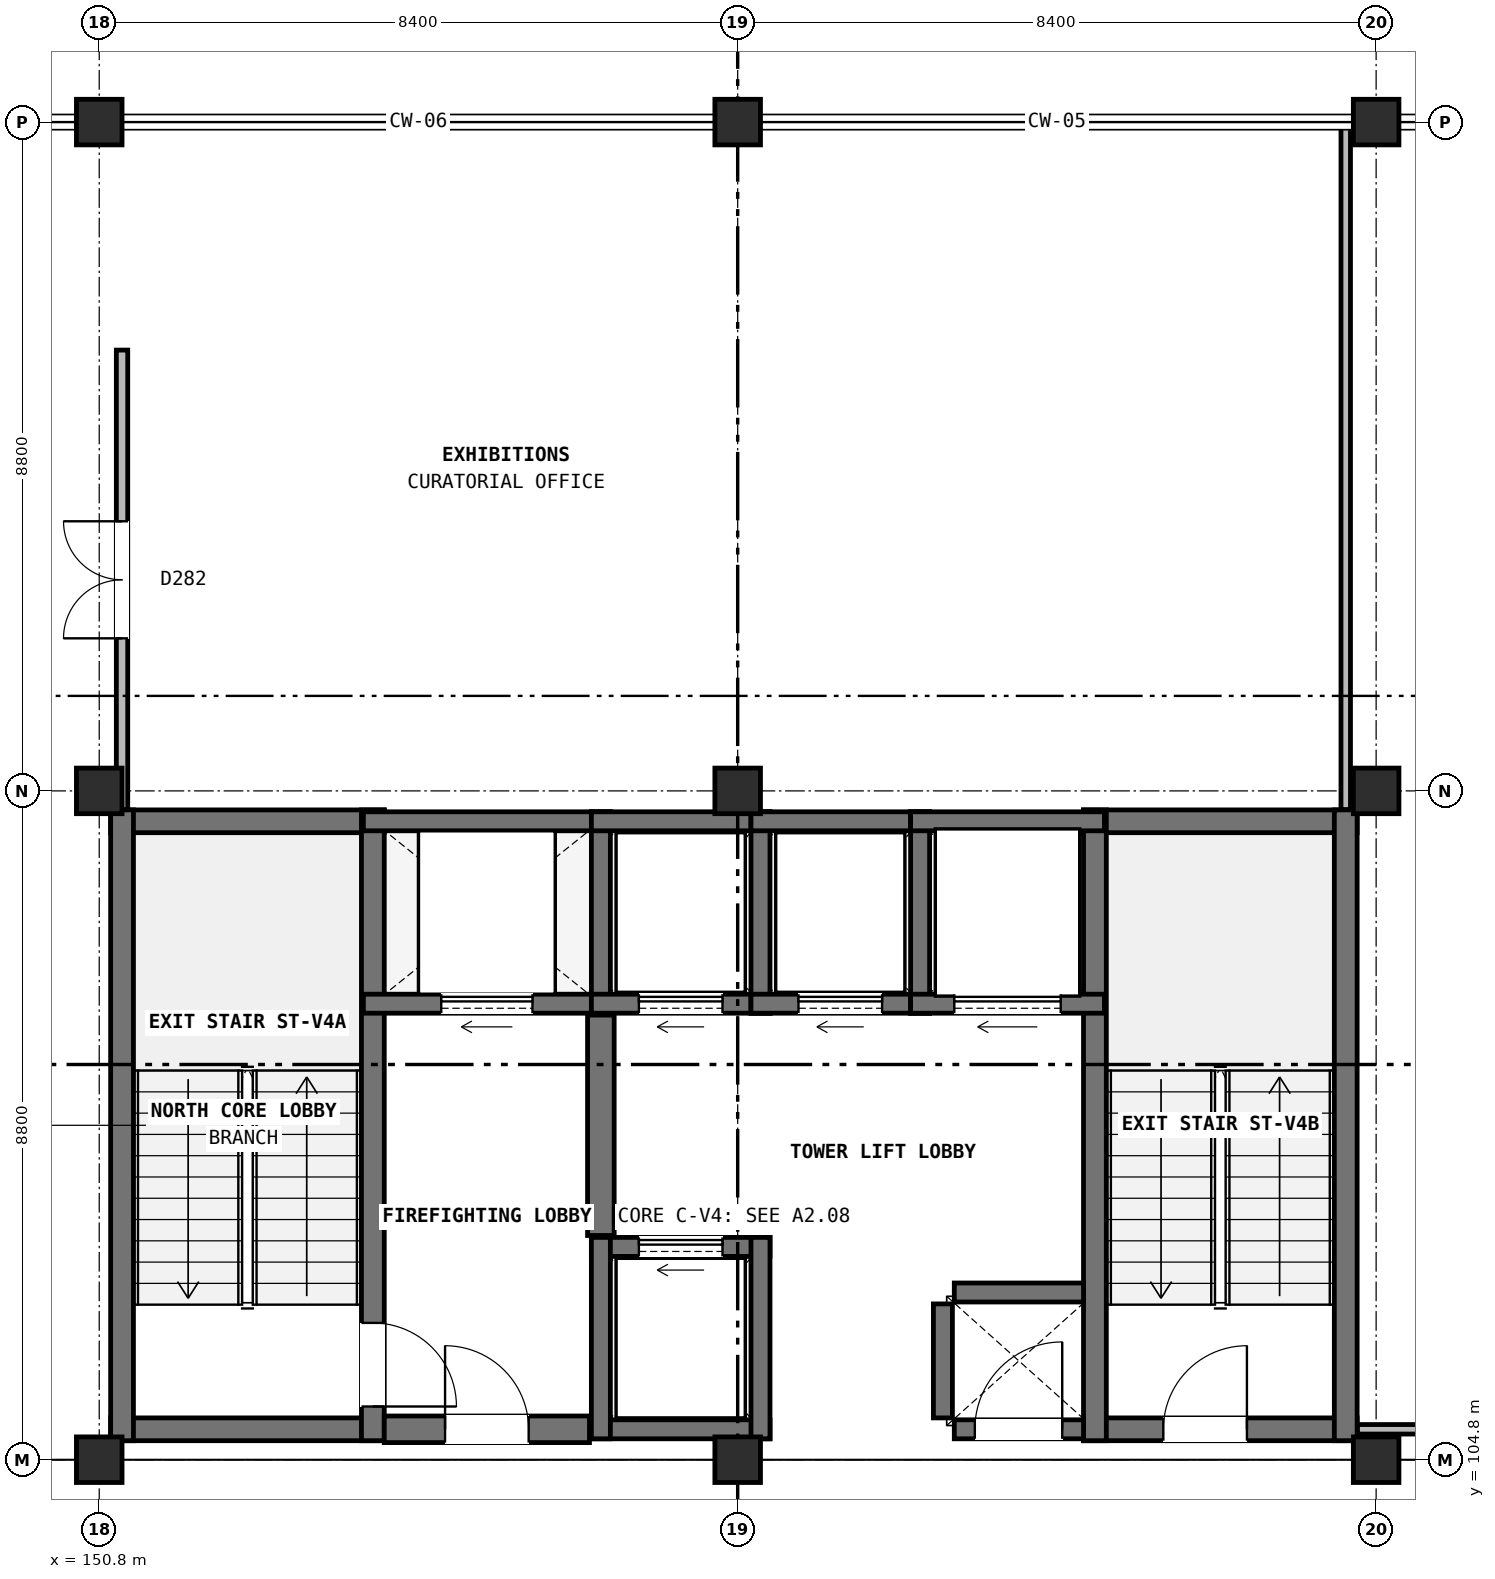
"""IFC4 building model, lengths in metres.
Left out: names, types, materials, properties, quantities, classifications, styles, units other than length and angle.
Written with IfcOpenShell. Run it as: python <this file> out.ifc"""

import sys

from ifc_helpers import new_model, si_unit, direction, frame, frame_2d, origin, origin_2d, place, context, subcontext, project, spatial, rectangle, extrude, element, fill, save


model = new_model("IFC4")
c1 = context("Model", 3, precision=1e-05, world=origin(), true_north=direction((0.0, 1.0)))
c2 = subcontext(c1, "Body", "Model", "MODEL_VIEW")
j1 = project(units=[si_unit("LENGTHUNIT", "METRE"), si_unit("PLANEANGLEUNIT", "RADIAN")], contexts=[c1])
p1 = place(None, origin())
s1 = spatial("IfcSite", under=j1, at=p1, CompositionType="ELEMENT")
p2 = place(p1, origin())
s2 = spatial("IfcBuilding", under=s1, at=p2, CompositionType="ELEMENT")
p3 = place(p2, frame((0.0, 0.0, 59.8)))
s3 = spatial("IfcBuildingStorey", under=s2, at=p3, CompositionType="ELEMENT", Elevation=59.8)
for number, where, z_axis, x_axis in (
    (1, (150.8, 104.8, 0.0), (0.0, 0.0, 1.0), (1.0, 0.0, 0.0)),
    (2, (150.8, 113.6, 0.0), (0.0, 0.0, 1.0), (1.0, 0.0, 0.0)),
    (3, (150.8, 122.4, 0.0), (0.0, 0.0, 1.0), (1.0, 0.0, 0.0)),
    (4, (159.2, 104.8, 0.0), (0.0, 0.0, 1.0), (1.0, 0.0, 0.0)),
    (5, (159.2, 113.6, 0.0), (0.0, 0.0, 1.0), (1.0, 0.0, 0.0)),
    (6, (159.2, 122.4, 0.0), (0.0, 0.0, 1.0), (1.0, 0.0, 0.0)),
    (7, (167.6, 104.8, 0.0), (0.0, 0.0, 1.0), (1.0, 0.0, 0.0)),
    (8, (167.6, 113.6, 0.0), (0.0, 0.0, 1.0), (1.0, 0.0, 0.0)),
    (9, (167.6, 122.4, 0.0), (0.0, 0.0, 1.0), (1.0, 0.0, 0.0)),
):
    element("IfcColumn", number, at=place(p3, frame(where, z_axis=z_axis, x_axis=x_axis)), inside=s3, PredefinedType="COLUMN", context=c2, shape_type="SweptSolid", body=[
        extrude(rectangle(XDim=0.6, YDim=0.6, at=origin_2d()), origin(), (0.0, 0.0, 1.0), 4.0),
    ])
for number, where, z_axis, x_axis in (
    (10, (150.95, 105.2, 0.0), (0.0, 0.0, 1.0), (1.0, 0.0, 0.0)),
    (11, (150.95, 113.2, 0.0), (0.0, 0.0, 1.0), (1.0, 0.0, 0.0)),
):
    element("IfcWall", number, at=place(p3, frame(where, z_axis=z_axis, x_axis=x_axis)), inside=s3, PredefinedType="SHEAR", context=c2, shape_type="SweptSolid", body=[
        extrude(rectangle(XDim=3.6, YDim=0.3, at=frame_2d((1.8, 0.0))), origin(), (0.0, 0.0, 1.0), 4.0),
    ])
p4 = place(p3, frame((151.1, 105.05, 0.0), z_axis=(0.0, 0.0, 1.0), x_axis=(0.0, 1.0, 0.0)))
e12 = element("IfcWall", 12, at=p4, inside=s3, PredefinedType="SHEAR", context=c2, shape_type="SweptSolid", body=[
    extrude(rectangle(XDim=8.3, YDim=0.3, at=frame_2d((4.15, 0.0))), origin(), (0.0, 0.0, 1.0), 4.0),
])
p5 = place(p3, frame((154.4, 105.05, 0.0), z_axis=(0.0, 0.0, 1.0), x_axis=(0.0, 1.0, 0.0)))
e13 = element("IfcWall", 13, at=p5, inside=s3, PredefinedType="SHEAR", context=c2, shape_type="SweptSolid", body=[
    extrude(rectangle(XDim=8.3, YDim=0.3, at=frame_2d((4.15, 0.0))), origin(), (0.0, 0.0, 1.0), 4.0),
])
p6 = place(p5, frame((0.45, 0.0, 0.0)))
e14 = element("IfcOpeningElement", 14, at=p6, cuts=e13, PredefinedType="OPENING", context=c2, shape_type="SweptSolid", body=[
    extrude(rectangle(XDim=1.1, YDim=2.2, at=frame_2d((0.55, 1.1))), frame((0.0, 0.16, 0.0), z_axis=(0.0, -1.0, 0.0), x_axis=(1.0, 0.0, 0.0)), (0.0, 0.0, 1.0), 0.32),
])
p7 = place(p3, frame((163.75, 105.2, 0.0), z_axis=(0.0, 0.0, 1.0), x_axis=(1.0, 0.0, 0.0)))
e15 = element("IfcWall", 15, at=p7, inside=s3, PredefinedType="SHEAR", context=c2, shape_type="SweptSolid", body=[
    extrude(rectangle(XDim=3.6, YDim=0.3, at=frame_2d((1.8, 0.0))), origin(), (0.0, 0.0, 1.0), 4.0),
])
p8 = place(p7, frame((1.05, 0.0, 0.0)))
e16 = element("IfcOpeningElement", 16, at=p8, cuts=e15, PredefinedType="OPENING", context=c2, shape_type="SweptSolid", body=[
    extrude(rectangle(XDim=1.1, YDim=2.2, at=frame_2d((0.55, 1.1))), frame((0.0, 0.16, 0.0), z_axis=(0.0, -1.0, 0.0), x_axis=(1.0, 0.0, 0.0)), (0.0, 0.0, 1.0), 0.32),
])
p9 = place(p3, frame((163.75, 113.2, 0.0), z_axis=(0.0, 0.0, 1.0), x_axis=(1.0, 0.0, 0.0)))
e17 = element("IfcWall", 17, at=p9, inside=s3, PredefinedType="SHEAR", context=c2, shape_type="SweptSolid", body=[
    extrude(rectangle(XDim=3.6, YDim=0.3, at=frame_2d((1.8, 0.0))), origin(), (0.0, 0.0, 1.0), 4.0),
])
for number, where, z_axis, x_axis in (
    (18, (163.9, 105.05, 0.0), (0.0, 0.0, 1.0), (0.0, 1.0, 0.0)),
    (19, (167.2, 105.05, 0.0), (0.0, 0.0, 1.0), (0.0, 1.0, 0.0)),
):
    element("IfcWall", number, at=place(p3, frame(where, z_axis=z_axis, x_axis=x_axis)), inside=s3, PredefinedType="SHEAR", context=c2, shape_type="SweptSolid", body=[
        extrude(rectangle(XDim=8.3, YDim=0.3, at=frame_2d((4.15, 0.0))), origin(), (0.0, 0.0, 1.0), 4.0),
    ])
p10 = place(p3, frame((154.275, 110.8, 0.0), z_axis=(0.0, 0.0, 1.0), x_axis=(1.0, 0.0, 0.0)))
e20 = element("IfcWall", 20, at=p10, inside=s3, PredefinedType="SOLIDWALL", context=c2, shape_type="SweptSolid", body=[
    extrude(rectangle(XDim=3.25, YDim=0.25, at=frame_2d((1.625, 0.0))), origin(), (0.0, 0.0, 1.0), 3.68),
])
p11 = place(p10, frame((1.025, 0.0, 0.0)))
e21 = element("IfcOpeningElement", 21, at=p11, cuts=e20, PredefinedType="OPENING", context=c2, shape_type="SweptSolid", body=[
    extrude(rectangle(XDim=1.2, YDim=2.2, at=frame_2d((0.6, 1.1))), frame((0.0, 0.135, 0.0), z_axis=(0.0, -1.0, 0.0), x_axis=(1.0, 0.0, 0.0)), (0.0, 0.0, 1.0), 0.27),
])
p12 = place(p3, frame((154.275, 113.2, 0.0), z_axis=(0.0, 0.0, 1.0), x_axis=(1.0, 0.0, 0.0)))
e22 = element("IfcWall", 22, at=p12, inside=s3, PredefinedType="SOLIDWALL", context=c2, shape_type="SweptSolid", body=[
    extrude(rectangle(XDim=3.25, YDim=0.25, at=frame_2d((1.625, 0.0))), origin(), (0.0, 0.0, 1.0), 3.68),
])
p13 = place(p3, frame((157.4, 110.675, 0.0), z_axis=(0.0, 0.0, 1.0), x_axis=(0.0, 1.0, 0.0)))
e23 = element("IfcWall", 23, at=p13, inside=s3, PredefinedType="SOLIDWALL", context=c2, shape_type="SweptSolid", body=[
    extrude(rectangle(XDim=2.65, YDim=0.25, at=frame_2d((1.325, 0.0))), origin(), (0.0, 0.0, 1.0), 3.68),
])
p14 = place(p3, frame((157.275, 110.8, 0.0), z_axis=(0.0, 0.0, 1.0), x_axis=(1.0, 0.0, 0.0)))
e24 = element("IfcWall", 24, at=p14, inside=s3, PredefinedType="SOLIDWALL", context=c2, shape_type="SweptSolid", body=[
    extrude(rectangle(XDim=2.35, YDim=0.25, at=frame_2d((1.175, 0.0))), origin(), (0.0, 0.0, 1.0), 3.68),
])
p15 = place(p14, frame((0.625, 0.0, 0.0)))
e25 = element("IfcOpeningElement", 25, at=p15, cuts=e24, PredefinedType="OPENING", context=c2, shape_type="SweptSolid", body=[
    extrude(rectangle(XDim=1.1, YDim=2.2, at=frame_2d((0.55, 1.1))), frame((0.0, 0.135, 0.0), z_axis=(0.0, -1.0, 0.0), x_axis=(1.0, 0.0, 0.0)), (0.0, 0.0, 1.0), 0.27),
])
p16 = place(p3, frame((157.275, 113.2, 0.0), z_axis=(0.0, 0.0, 1.0), x_axis=(1.0, 0.0, 0.0)))
e26 = element("IfcWall", 26, at=p16, inside=s3, PredefinedType="SOLIDWALL", context=c2, shape_type="SweptSolid", body=[
    extrude(rectangle(XDim=2.35, YDim=0.25, at=frame_2d((1.175, 0.0))), origin(), (0.0, 0.0, 1.0), 3.68),
])
p17 = place(p3, frame((159.5, 110.675, 0.0), z_axis=(0.0, 0.0, 1.0), x_axis=(0.0, 1.0, 0.0)))
e27 = element("IfcWall", 27, at=p17, inside=s3, PredefinedType="SOLIDWALL", context=c2, shape_type="SweptSolid", body=[
    extrude(rectangle(XDim=2.65, YDim=0.25, at=frame_2d((1.325, 0.0))), origin(), (0.0, 0.0, 1.0), 3.68),
])
p18 = place(p3, frame((159.375, 110.8, 0.0), z_axis=(0.0, 0.0, 1.0), x_axis=(1.0, 0.0, 0.0)))
e28 = element("IfcWall", 28, at=p18, inside=s3, PredefinedType="SOLIDWALL", context=c2, shape_type="SweptSolid", body=[
    extrude(rectangle(XDim=2.35, YDim=0.25, at=frame_2d((1.175, 0.0))), origin(), (0.0, 0.0, 1.0), 3.68),
])
p19 = place(p18, frame((0.625, 0.0, 0.0)))
e29 = element("IfcOpeningElement", 29, at=p19, cuts=e28, PredefinedType="OPENING", context=c2, shape_type="SweptSolid", body=[
    extrude(rectangle(XDim=1.1, YDim=2.2, at=frame_2d((0.55, 1.1))), frame((0.0, 0.135, 0.0), z_axis=(0.0, -1.0, 0.0), x_axis=(1.0, 0.0, 0.0)), (0.0, 0.0, 1.0), 0.27),
])
p20 = place(p3, frame((159.375, 113.2, 0.0), z_axis=(0.0, 0.0, 1.0), x_axis=(1.0, 0.0, 0.0)))
e30 = element("IfcWall", 30, at=p20, inside=s3, PredefinedType="SOLIDWALL", context=c2, shape_type="SweptSolid", body=[
    extrude(rectangle(XDim=2.35, YDim=0.25, at=frame_2d((1.175, 0.0))), origin(), (0.0, 0.0, 1.0), 3.68),
])
p21 = place(p3, frame((161.6, 110.675, 0.0), z_axis=(0.0, 0.0, 1.0), x_axis=(0.0, 1.0, 0.0)))
e31 = element("IfcWall", 31, at=p21, inside=s3, PredefinedType="SOLIDWALL", context=c2, shape_type="SweptSolid", body=[
    extrude(rectangle(XDim=2.65, YDim=0.25, at=frame_2d((1.325, 0.0))), origin(), (0.0, 0.0, 1.0), 3.68),
])
p22 = place(p3, frame((157.275, 105.2, 0.0), z_axis=(0.0, 0.0, 1.0), x_axis=(1.0, 0.0, 0.0)))
e32 = element("IfcWall", 32, at=p22, inside=s3, PredefinedType="SOLIDWALL", context=c2, shape_type="SweptSolid", body=[
    extrude(rectangle(XDim=2.35, YDim=0.25, at=frame_2d((1.175, 0.0))), origin(), (0.0, 0.0, 1.0), 3.68),
])
p23 = place(p3, frame((157.275, 107.6, 0.0), z_axis=(0.0, 0.0, 1.0), x_axis=(1.0, 0.0, 0.0)))
e33 = element("IfcWall", 33, at=p23, inside=s3, PredefinedType="SOLIDWALL", context=c2, shape_type="SweptSolid", body=[
    extrude(rectangle(XDim=2.35, YDim=0.25, at=frame_2d((1.175, 0.0))), origin(), (0.0, 0.0, 1.0), 3.68),
])
p24 = place(p23, frame((0.625, 0.0, 0.0)))
e34 = element("IfcOpeningElement", 34, at=p24, cuts=e33, PredefinedType="OPENING", context=c2, shape_type="SweptSolid", body=[
    extrude(rectangle(XDim=1.1, YDim=2.2, at=frame_2d((0.55, 1.1))), frame((0.0, 0.135, 0.0), z_axis=(0.0, -1.0, 0.0), x_axis=(1.0, 0.0, 0.0)), (0.0, 0.0, 1.0), 0.27),
])
for number, where, z_axis, x_axis in (
    (35, (157.4, 105.075, 0.0), (0.0, 0.0, 1.0), (0.0, 1.0, 0.0)),
    (36, (159.5, 105.075, 0.0), (0.0, 0.0, 1.0), (0.0, 1.0, 0.0)),
):
    element("IfcWall", number, at=place(p3, frame(where, z_axis=z_axis, x_axis=x_axis)), inside=s3, PredefinedType="SOLIDWALL", context=c2, shape_type="SweptSolid", body=[
        extrude(rectangle(XDim=2.65, YDim=0.25, at=frame_2d((1.325, 0.0))), origin(), (0.0, 0.0, 1.0), 3.68),
    ])
p25 = place(p3, frame((161.475, 110.8, 0.0), z_axis=(0.0, 0.0, 1.0), x_axis=(1.0, 0.0, 0.0)))
e37 = element("IfcWall", 37, at=p25, inside=s3, PredefinedType="SOLIDWALL", context=c2, shape_type="SweptSolid", body=[
    extrude(rectangle(XDim=2.55, YDim=0.25, at=frame_2d((1.275, 0.0))), origin(), (0.0, 0.0, 1.0), 3.68),
])
p26 = place(p25, frame((0.575, 0.0, 0.0)))
e38 = element("IfcOpeningElement", 38, at=p26, cuts=e37, PredefinedType="OPENING", context=c2, shape_type="SweptSolid", body=[
    extrude(rectangle(XDim=1.4, YDim=2.3, at=frame_2d((0.7, 1.15))), frame((0.0, 0.135, 0.0), z_axis=(0.0, -1.0, 0.0), x_axis=(1.0, 0.0, 0.0)), (0.0, 0.0, 1.0), 0.27),
])
p27 = place(p3, frame((161.475, 113.2, 0.0), z_axis=(0.0, 0.0, 1.0), x_axis=(1.0, 0.0, 0.0)))
e39 = element("IfcWall", 39, at=p27, inside=s3, PredefinedType="SOLIDWALL", context=c2, shape_type="SweptSolid", body=[
    extrude(rectangle(XDim=2.55, YDim=0.25, at=frame_2d((1.275, 0.0))), origin(), (0.0, 0.0, 1.0), 3.68),
])
p28 = place(p3, frame((157.4, 107.75, 0.0), z_axis=(0.0, 0.0, 1.0), x_axis=(0.0, 1.0, 0.0)))
e40 = element("IfcWall", 40, at=p28, inside=s3, PredefinedType="SHEAR", context=c2, shape_type="SweptSolid", body=[
    extrude(rectangle(XDim=2.9, YDim=0.35, at=frame_2d((1.45, 0.0))), origin(), (0.0, 0.0, 1.0), 3.68),
])
p29 = place(p3, frame((154.55, 105.2, 0.0), z_axis=(0.0, 0.0, 1.0), x_axis=(1.0, 0.0, 0.0)))
e41 = element("IfcWall", 41, at=p29, inside=s3, PredefinedType="SHEAR", context=c2, shape_type="SweptSolid", body=[
    extrude(rectangle(XDim=2.7, YDim=0.35, at=frame_2d((1.35, 0.0))), origin(), (0.0, 0.0, 1.0), 3.68),
])
p30 = place(p29, frame((0.8, 0.0, 0.0)))
e42 = element("IfcOpeningElement", 42, at=p30, cuts=e41, PredefinedType="OPENING", context=c2, shape_type="SweptSolid", body=[
    extrude(rectangle(XDim=1.1, YDim=2.2, at=frame_2d((0.55, 1.1))), frame((0.0, 0.185, 0.0), z_axis=(0.0, -1.0, 0.0), x_axis=(1.0, 0.0, 0.0)), (0.0, 0.0, 1.0), 0.37),
])
p31 = place(p3, frame((161.9, 105.35, 0.0), z_axis=(0.0, 0.0, 1.0), x_axis=(0.0, 1.0, 0.0)))
e43 = element("IfcWall", 43, at=p31, inside=s3, PredefinedType="SOLIDWALL", context=c2, shape_type="SweptSolid", body=[
    extrude(rectangle(XDim=1.5, YDim=0.25, at=frame_2d((0.75, 0.0))), origin(), (0.0, 0.0, 1.0), 3.68),
])
p32 = place(p3, frame((162.05, 107.0, 0.0), z_axis=(0.0, 0.0, 1.0), x_axis=(1.0, 0.0, 0.0)))
e44 = element("IfcWall", 44, at=p32, inside=s3, PredefinedType="SOLIDWALL", context=c2, shape_type="SweptSolid", body=[
    extrude(rectangle(XDim=1.7, YDim=0.25, at=frame_2d((0.85, 0.0))), origin(), (0.0, 0.0, 1.0), 3.68),
])
p33 = place(p3, frame((162.05, 105.2, 0.0), z_axis=(0.0, 0.0, 1.0), x_axis=(1.0, 0.0, 0.0)))
e45 = element("IfcWall", 45, at=p33, inside=s3, PredefinedType="SOLIDWALL", context=c2, shape_type="SweptSolid", body=[
    extrude(rectangle(XDim=1.7, YDim=0.25, at=frame_2d((0.85, 0.0))), origin(), (0.0, 0.0, 1.0), 3.68),
])
p34 = place(p33, frame((0.27, 0.0, 0.0)))
e46 = element("IfcOpeningElement", 46, at=p34, cuts=e45, PredefinedType="OPENING", context=c2, shape_type="SweptSolid", body=[
    extrude(rectangle(XDim=1.15, YDim=2.2, at=frame_2d((0.575, 1.1))), frame((0.0, 0.135, 0.0), z_axis=(0.0, -1.0, 0.0), x_axis=(1.0, 0.0, 0.0)), (0.0, 0.0, 1.0), 0.27),
])
p35 = place(p3, frame((167.355, 105.2, 0.0), z_axis=(0.0, 0.0, 1.0), x_axis=(1.0, 0.0, 0.0)))
e47 = element("IfcWall", 47, at=p35, inside=s3, PredefinedType="PARTITIONING", context=c2, shape_type="SweptSolid", body=[
    extrude(rectangle(XDim=4.245, YDim=0.125, at=frame_2d((2.123, 0.0))), origin(), (0.0, 0.0, 1.0), 3.245),
])
p36 = place(p35, frame((1.633, 0.0, 0.0)))
e48 = element("IfcOpeningElement", 48, at=p36, cuts=e47, PredefinedType="OPENING", context=c2, shape_type="SweptSolid", body=[
    extrude(rectangle(XDim=0.98, YDim=2.1, at=frame_2d((0.49, 1.05))), frame((0.0, 0.073, 0.0), z_axis=(0.0, -1.0, 0.0), x_axis=(1.0, 0.0, 0.0)), (0.0, 0.0, 1.0), 0.145),
])
p37 = place(p3, frame((151.1, 113.355, 0.0), z_axis=(0.0, 0.0, 1.0), x_axis=(0.0, 1.0, 0.0)))
e49 = element("IfcWall", 49, at=p37, inside=s3, PredefinedType="PARTITIONING", context=c2, shape_type="SweptSolid", body=[
    extrude(rectangle(XDim=6.045, YDim=0.15, at=frame_2d((3.022, 0.0))), origin(), (0.0, 0.0, 1.0), 3.245),
])
p38 = place(p37, frame((2.252, 0.0, 0.0)))
e50 = element("IfcOpeningElement", 50, at=p38, cuts=e49, PredefinedType="OPENING", context=c2, shape_type="SweptSolid", body=[
    extrude(rectangle(XDim=1.54, YDim=2.3, at=frame_2d((0.77, 1.15))), frame((0.0, 0.085, 0.0), z_axis=(0.0, -1.0, 0.0), x_axis=(1.0, 0.0, 0.0)), (0.0, 0.0, 1.0), 0.17),
])
p39 = place(p3, frame((167.2, 113.355, 0.0), z_axis=(0.0, 0.0, 1.0), x_axis=(0.0, 1.0, 0.0)))
e51 = element("IfcWall", 51, at=p39, inside=s3, PredefinedType="PARTITIONING", context=c2, shape_type="SweptSolid", body=[
    extrude(rectangle(XDim=9.045, YDim=0.125, at=frame_2d((4.522, 0.0))), origin(), (0.0, 0.0, 1.0), 3.245),
])
p40 = place(p6, frame((1.1, 0.0, 0.0), z_axis=(0.0, 0.0, 1.0), x_axis=(-1.0, 0.0, 0.0)))
e52 = element("IfcDoor", 52, at=p40, inside=s3, OperationType="SINGLE_SWING_LEFT", PredefinedType="DOOR", context=c2, shape_type="SweptSolid", body=[
    extrude(rectangle(XDim=1.1, YDim=2.2, at=frame_2d((0.55, 1.1))), frame((0.0, 0.025, 0.0), z_axis=(0.0, -1.0, 0.0), x_axis=(1.0, 0.0, 0.0)), (0.0, 0.0, 1.0), 0.05),
])
fill(e14, e52)
p41 = place(p8, origin())
e53 = element("IfcDoor", 53, at=p41, inside=s3, OperationType="SINGLE_SWING_RIGHT", PredefinedType="DOOR", context=c2, shape_type="SweptSolid", body=[
    extrude(rectangle(XDim=1.1, YDim=2.2, at=frame_2d((0.55, 1.1))), frame((0.0, 0.025, 0.0), z_axis=(0.0, -1.0, 0.0), x_axis=(1.0, 0.0, 0.0)), (0.0, 0.0, 1.0), 0.05),
])
fill(e16, e53)
p42 = place(p11, origin())
e54 = element("IfcDoor", 54, at=p42, inside=s3, OperationType="SLIDING_TO_LEFT", PredefinedType="DOOR", context=c2, shape_type="SweptSolid", body=[
    extrude(rectangle(XDim=1.2, YDim=2.2, at=frame_2d((0.6, 1.1))), frame((0.0, 0.025, 0.0), z_axis=(0.0, -1.0, 0.0), x_axis=(1.0, 0.0, 0.0)), (0.0, 0.0, 1.0), 0.05),
])
fill(e21, e54)
p43 = place(p15, origin())
e55 = element("IfcDoor", 55, at=p43, inside=s3, OperationType="SLIDING_TO_LEFT", PredefinedType="DOOR", context=c2, shape_type="SweptSolid", body=[
    extrude(rectangle(XDim=1.1, YDim=2.2, at=frame_2d((0.55, 1.1))), frame((0.0, 0.025, 0.0), z_axis=(0.0, -1.0, 0.0), x_axis=(1.0, 0.0, 0.0)), (0.0, 0.0, 1.0), 0.05),
])
fill(e25, e55)
p44 = place(p19, origin())
e56 = element("IfcDoor", 56, at=p44, inside=s3, OperationType="SLIDING_TO_LEFT", PredefinedType="DOOR", context=c2, shape_type="SweptSolid", body=[
    extrude(rectangle(XDim=1.1, YDim=2.2, at=frame_2d((0.55, 1.1))), frame((0.0, 0.025, 0.0), z_axis=(0.0, -1.0, 0.0), x_axis=(1.0, 0.0, 0.0)), (0.0, 0.0, 1.0), 0.05),
])
fill(e29, e56)
p45 = place(p24, origin())
e57 = element("IfcDoor", 57, at=p45, inside=s3, OperationType="SLIDING_TO_LEFT", PredefinedType="DOOR", context=c2, shape_type="SweptSolid", body=[
    extrude(rectangle(XDim=1.1, YDim=2.2, at=frame_2d((0.55, 1.1))), frame((0.0, 0.025, 0.0), z_axis=(0.0, -1.0, 0.0), x_axis=(1.0, 0.0, 0.0)), (0.0, 0.0, 1.0), 0.05),
])
fill(e34, e57)
p46 = place(p26, origin())
e58 = element("IfcDoor", 58, at=p46, inside=s3, OperationType="SLIDING_TO_LEFT", PredefinedType="DOOR", context=c2, shape_type="SweptSolid", body=[
    extrude(rectangle(XDim=1.4, YDim=2.3, at=frame_2d((0.7, 1.15))), frame((0.0, 0.025, 0.0), z_axis=(0.0, -1.0, 0.0), x_axis=(1.0, 0.0, 0.0)), (0.0, 0.0, 1.0), 0.05),
])
fill(e38, e58)
p47 = place(p30, origin())
e59 = element("IfcDoor", 59, at=p47, inside=s3, OperationType="SINGLE_SWING_LEFT", PredefinedType="DOOR", context=c2, shape_type="SweptSolid", body=[
    extrude(rectangle(XDim=1.1, YDim=2.2, at=frame_2d((0.55, 1.1))), frame((0.0, 0.025, 0.0), z_axis=(0.0, -1.0, 0.0), x_axis=(1.0, 0.0, 0.0)), (0.0, 0.0, 1.0), 0.05),
])
fill(e42, e59)
p48 = place(p34, origin())
e60 = element("IfcDoor", 60, at=p48, inside=s3, OperationType="SINGLE_SWING_RIGHT", PredefinedType="DOOR", context=c2, shape_type="SweptSolid", body=[
    extrude(rectangle(XDim=1.15, YDim=2.2, at=frame_2d((0.575, 1.1))), frame((0.0, 0.025, 0.0), z_axis=(0.0, -1.0, 0.0), x_axis=(1.0, 0.0, 0.0)), (0.0, 0.0, 1.0), 0.05),
])
fill(e46, e60)
p49 = place(p38, origin())
e61 = element("IfcDoor", 61, at=p49, inside=s3, OperationType="DOUBLE_DOOR_SINGLE_SWING", PredefinedType="DOOR", context=c2, shape_type="SweptSolid", body=[
    extrude(rectangle(XDim=1.54, YDim=2.3, at=frame_2d((0.77, 1.15))), frame((0.0, 0.025, 0.0), z_axis=(0.0, -1.0, 0.0), x_axis=(1.0, 0.0, 0.0)), (0.0, 0.0, 1.0), 0.05),
])
fill(e50, e61)
save(model, sys.argv[1])
